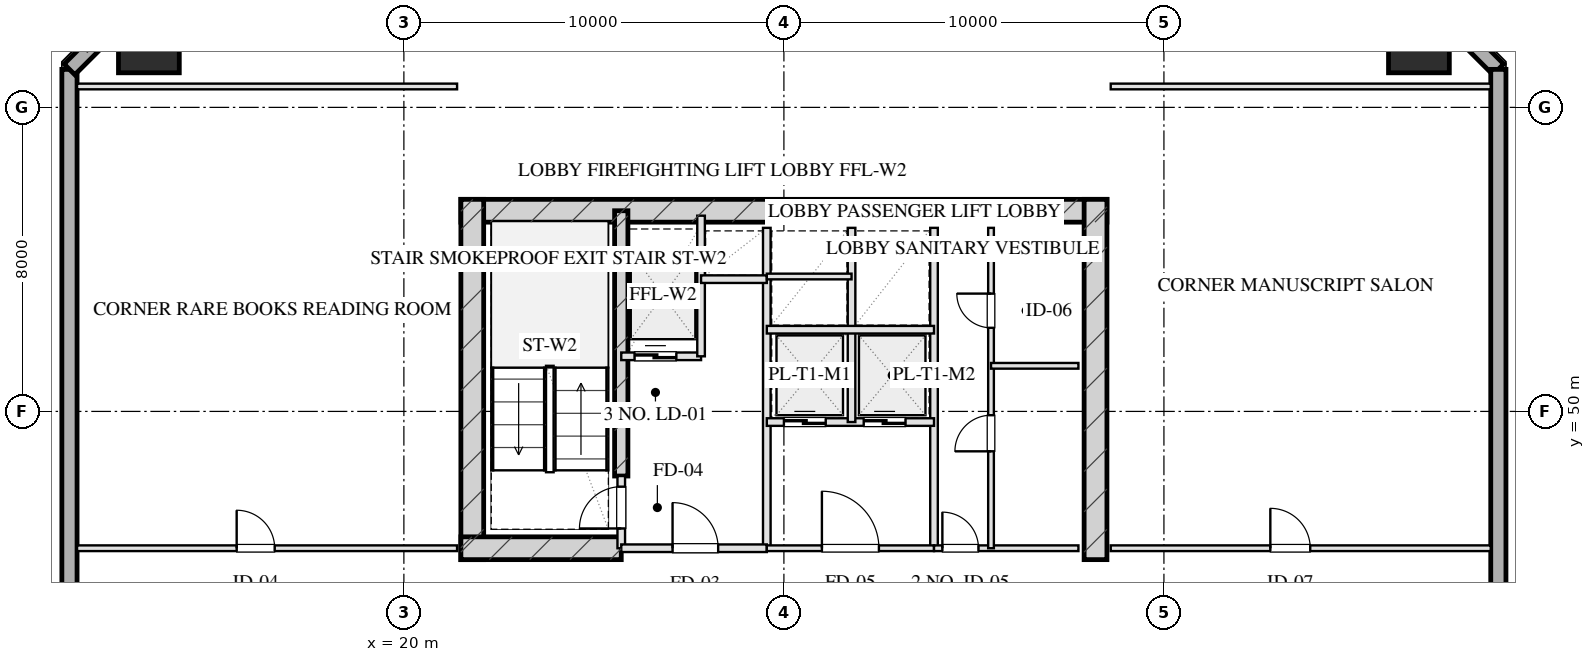
"""IFC4 building model, lengths in metres.
Left out: names, types, materials, properties, quantities, classifications, styles, units other than length and angle.
Written with IfcOpenShell. Run it as: python <this file> out.ifc"""

import sys

from ifc_helpers import new_model, si_unit, direction, frame, frame_2d, origin, origin_2d, place, context, subcontext, project, spatial, rectangle, hollow_rectangle, extrude, element, fill, save


model = new_model("IFC4")
c1 = context("Model", 3, precision=1e-05, world=origin(), true_north=direction((0.0, 1.0)))
c2 = subcontext(c1, "Body", "Model", "MODEL_VIEW")
j1 = project(units=[si_unit("LENGTHUNIT", "METRE"), si_unit("PLANEANGLEUNIT", "RADIAN")], contexts=[c1])
p1 = place(None, origin())
s1 = spatial("IfcSite", under=j1, at=p1, CompositionType="ELEMENT")
p2 = place(p1, origin())
s2 = spatial("IfcBuilding", under=s1, at=p2, CompositionType="ELEMENT")
p3 = place(p2, frame((0.0, 0.0, 100.05)))
s3 = spatial("IfcBuildingStorey", under=s2, at=p3, CompositionType="ELEMENT", Elevation=100.05)
p4 = place(p3, frame((21.5, 55.28, 0.0), z_axis=(0.0, 0.0, 1.0), x_axis=(1.0, 0.0, 0.0)))
e1 = element("IfcWall", 1, at=p4, inside=s3, PredefinedType="SHEAR", context=c2, shape_type="SweptSolid", body=[
    extrude(rectangle(XDim=17.0, YDim=0.6, at=frame_2d((8.5, 0.0))), origin(), (0.0, 0.0, 1.0), 3.45),
])
for number, where, z_axis, x_axis in (
    (2, (21.8, 46.1, 0.0), (0.0, 0.0, 1.0), (0.0, 1.0, 0.0)),
    (3, (38.2, 46.1, 0.0), (0.0, 0.0, 1.0), (0.0, 1.0, 0.0)),
):
    element("IfcWall", number, at=place(p3, frame(where, z_axis=z_axis, x_axis=x_axis)), inside=s3, PredefinedType="SHEAR", context=c2, shape_type="SweptSolid", body=[
        extrude(rectangle(XDim=9.48, YDim=0.6, at=frame_2d((4.74, 0.0))), origin(), (0.0, 0.0, 1.0), 3.45),
    ])
p5 = place(p3, frame((25.72, 48.3, 0.0), z_axis=(0.0, 0.0, 1.0), x_axis=(0.0, 1.0, 0.0)))
e4 = element("IfcWall", 4, at=p5, inside=s3, PredefinedType="SHEAR", context=c2, shape_type="SweptSolid", body=[
    extrude(rectangle(XDim=6.98, YDim=0.35, at=frame_2d((3.49, 0.0))), origin(), (0.0, 0.0, 1.0), 3.45),
])
p6 = place(p3, frame((21.5, 46.4, 0.0), z_axis=(0.0, 0.0, 1.0), x_axis=(1.0, 0.0, 0.0)))
e5 = element("IfcWall", 5, at=p6, inside=s3, PredefinedType="SHEAR", context=c2, shape_type="SweptSolid", body=[
    extrude(rectangle(XDim=4.22, YDim=0.6, at=frame_2d((2.11, 0.0))), origin(), (0.0, 0.0, 1.0), 3.45),
])
for number, where, z_axis, x_axis in (
    (6, (46.71, 59.71, 0.0), (0.0, 0.0, 1.0), (1.0, 0.0, 0.0)),
    (7, (13.29, 59.71, 0.0), (0.0, 0.0, 1.0), (1.0, 0.0, 0.0)),
):
    element("IfcColumn", number, at=place(p3, frame(where, z_axis=z_axis, x_axis=x_axis)), inside=s3, PredefinedType="COLUMN", context=c2, shape_type="SweptSolid", body=[
        extrude(hollow_rectangle(XDim=1.6, YDim=1.6, WallThickness=0.055, at=origin_2d()), origin(), (0.0, 0.0, 1.0), 3.451),
    ])
p7 = place(p3, frame((11.2, 9.0, 0.0), z_axis=(0.0, 0.0, 1.0), x_axis=(0.0, 1.0, 0.0)))
e8 = element("IfcWall", 8, at=p7, inside=s3, PredefinedType="SOLIDWALL", context=c2, shape_type="SweptSolid", body=[
    extrude(rectangle(XDim=50.0, YDim=0.4, at=frame_2d((25.0, 0.0))), origin(), (0.0, 0.0, 1.0), 2.55),
])
p8 = place(p7, frame((21.2, 0.0, 0.75)))
e9 = element("IfcOpeningElement", 9, at=p8, cuts=e8, PredefinedType="OPENING", context=c2, shape_type="SweptSolid", body=[
    extrude(rectangle(XDim=2.4, YDim=1.4, at=frame_2d((1.2, 0.7))), frame((0.0, 0.21, 0.0), z_axis=(0.0, -1.0, 0.0), x_axis=(1.0, 0.0, 0.0)), (0.0, 0.0, 1.0), 0.42),
])
p9 = place(p7, frame((27.55, 0.0, 0.0)))
e10 = element("IfcOpeningElement", 10, at=p9, cuts=e8, PredefinedType="OPENING", context=c2, shape_type="SweptSolid", body=[
    extrude(rectangle(XDim=1.1, YDim=2.15, at=frame_2d((0.55, 1.075))), frame((0.0, 0.21, 0.0), z_axis=(0.0, -1.0, 0.0), x_axis=(1.0, 0.0, 0.0)), (0.0, 0.0, 1.0), 0.42),
])
for number, where, z_axis, x_axis in (
    (11, (11.2, 59.0, 0.0), (0.0, 0.0, 1.0), (0.707, 0.707, 0.0)),
    (12, (46.0, 61.8, 0.0), (0.0, 0.0, 1.0), (0.707, -0.707, 0.0)),
):
    element("IfcWall", number, at=place(p3, frame(where, z_axis=z_axis, x_axis=x_axis)), inside=s3, PredefinedType="SOLIDWALL", context=c2, shape_type="SweptSolid", body=[
        extrude(rectangle(XDim=3.96, YDim=0.4, at=frame_2d((1.98, 0.0))), origin(), (0.0, 0.0, 1.0), 2.55),
    ])
p10 = place(p3, frame((48.8, 59.0, 0.0), z_axis=(0.0, 0.0, 1.0), x_axis=(0.0, -1.0, 0.0)))
e13 = element("IfcWall", 13, at=p10, inside=s3, PredefinedType="SOLIDWALL", context=c2, shape_type="SweptSolid", body=[
    extrude(rectangle(XDim=50.0, YDim=0.4, at=frame_2d((25.0, 0.0))), origin(), (0.0, 0.0, 1.0), 2.55),
])
p11 = place(p10, frame((18.65, 0.0, 0.0)))
e14 = element("IfcOpeningElement", 14, at=p11, cuts=e13, PredefinedType="OPENING", context=c2, shape_type="SweptSolid", body=[
    extrude(rectangle(XDim=1.1, YDim=2.15, at=frame_2d((0.55, 1.075))), frame((0.0, 0.21, 0.0), z_axis=(0.0, -1.0, 0.0), x_axis=(1.0, 0.0, 0.0)), (0.0, 0.0, 1.0), 0.42),
])
p12 = place(p3, frame((25.72, 46.4, 0.0), z_axis=(0.0, 0.0, 1.0), x_axis=(0.0, 1.0, 0.0)))
e15 = element("IfcWall", 15, at=p12, inside=s3, PredefinedType="PARTITIONING", context=c2, shape_type="SweptSolid", body=[
    extrude(rectangle(XDim=1.9, YDim=0.2, at=frame_2d((0.95, 0.0))), origin(), (0.0, 0.0, 1.0), 3.155),
])
p13 = place(p12, frame((0.52, 0.0, 0.0)))
e16 = element("IfcOpeningElement", 16, at=p13, cuts=e15, PredefinedType="OPENING", context=c2, shape_type="SweptSolid", body=[
    extrude(rectangle(XDim=1.1, YDim=2.05, at=frame_2d((0.55, 1.025))), frame((0.0, 0.11, 0.0), z_axis=(0.0, -1.0, 0.0), x_axis=(1.0, 0.0, 0.0)), (0.0, 0.0, 1.0), 0.22),
])
p14 = place(p3, frame((29.55, 46.4, 0.0), z_axis=(0.0, 0.0, 1.0), x_axis=(0.0, 1.0, 0.0)))
e17 = element("IfcWall", 17, at=p14, inside=s3, PredefinedType="PARTITIONING", context=c2, shape_type="SweptSolid", body=[
    extrude(rectangle(XDim=8.43, YDim=0.2, at=frame_2d((4.215, 0.0))), origin(), (0.0, 0.0, 1.0), 3.155),
])
p15 = place(p3, frame((25.72, 46.4, 0.0), z_axis=(0.0, 0.0, 1.0), x_axis=(1.0, 0.0, 0.0)))
e18 = element("IfcWall", 18, at=p15, inside=s3, PredefinedType="PARTITIONING", context=c2, shape_type="SweptSolid", body=[
    extrude(rectangle(XDim=3.83, YDim=0.2, at=frame_2d((1.915, 0.0))), origin(), (0.0, 0.0, 1.0), 3.155),
])
p16 = place(p15, frame((1.35, 0.0, 0.0)))
e19 = element("IfcOpeningElement", 19, at=p16, cuts=e18, PredefinedType="OPENING", context=c2, shape_type="SweptSolid", body=[
    extrude(rectangle(XDim=1.2, YDim=2.05, at=frame_2d((0.6, 1.025))), frame((0.0, 0.11, 0.0), z_axis=(0.0, -1.0, 0.0), x_axis=(1.0, 0.0, 0.0)), (0.0, 0.0, 1.0), 0.22),
])
p17 = place(p3, frame((25.72, 51.45, 0.0), z_axis=(0.0, 0.0, 1.0), x_axis=(1.0, 0.0, 0.0)))
e20 = element("IfcWall", 20, at=p17, inside=s3, PredefinedType="PARTITIONING", context=c2, shape_type="SweptSolid", body=[
    extrude(rectangle(XDim=2.1, YDim=0.2, at=frame_2d((1.05, 0.0))), origin(), (0.0, 0.0, 1.0), 3.155),
])
p18 = place(p17, frame((0.35, 0.0, 0.0)))
e21 = element("IfcOpeningElement", 21, at=p18, cuts=e20, PredefinedType="OPENING", context=c2, shape_type="SweptSolid", body=[
    extrude(rectangle(XDim=1.1, YDim=2.05, at=frame_2d((0.55, 1.025))), frame((0.0, 0.11, 0.0), z_axis=(0.0, -1.0, 0.0), x_axis=(1.0, 0.0, 0.0)), (0.0, 0.0, 1.0), 0.22),
])
p19 = place(p3, frame((27.82, 51.45, 0.0), z_axis=(0.0, 0.0, 1.0), x_axis=(0.0, 1.0, 0.0)))
e22 = element("IfcWall", 22, at=p19, inside=s3, PredefinedType="PARTITIONING", context=c2, shape_type="SweptSolid", body=[
    extrude(rectangle(XDim=3.7, YDim=0.2, at=frame_2d((1.85, 0.0))), origin(), (0.0, 0.0, 1.0), 3.155),
])
p20 = place(p3, frame((27.82, 53.48, 0.0), z_axis=(0.0, 0.0, 1.0), x_axis=(1.0, 0.0, 0.0)))
e23 = element("IfcWall", 23, at=p20, inside=s3, PredefinedType="PARTITIONING", context=c2, shape_type="SweptSolid", body=[
    extrude(rectangle(XDim=1.73, YDim=0.2, at=frame_2d((0.865, 0.0))), origin(), (0.0, 0.0, 1.0), 3.155),
])
p21 = place(p3, frame((33.95, 46.4, 0.0), z_axis=(0.0, 0.0, 1.0), x_axis=(0.0, 1.0, 0.0)))
e24 = element("IfcWall", 24, at=p21, inside=s3, PredefinedType="PARTITIONING", context=c2, shape_type="SweptSolid", body=[
    extrude(rectangle(XDim=8.43, YDim=0.2, at=frame_2d((4.215, 0.0))), origin(), (0.0, 0.0, 1.0), 3.155),
])
p22 = place(p3, frame((29.55, 46.4, 0.0), z_axis=(0.0, 0.0, 1.0), x_axis=(1.0, 0.0, 0.0)))
e25 = element("IfcWall", 25, at=p22, inside=s3, PredefinedType="PARTITIONING", context=c2, shape_type="SweptSolid", body=[
    extrude(rectangle(XDim=4.4, YDim=0.15, at=frame_2d((2.2, 0.0))), origin(), (0.0, 0.0, 1.0), 3.155),
])
p23 = place(p22, frame((1.45, 0.0, 0.0)))
e26 = element("IfcOpeningElement", 26, at=p23, cuts=e25, PredefinedType="OPENING", context=c2, shape_type="SweptSolid", body=[
    extrude(rectangle(XDim=1.5, YDim=2.05, at=frame_2d((0.75, 1.025))), frame((0.0, 0.085, 0.0), z_axis=(0.0, -1.0, 0.0), x_axis=(1.0, 0.0, 0.0)), (0.0, 0.0, 1.0), 0.17),
])
p24 = place(p3, frame((29.55, 49.72, 0.0), z_axis=(0.0, 0.0, 1.0), x_axis=(1.0, 0.0, 0.0)))
e27 = element("IfcWall", 27, at=p24, inside=s3, PredefinedType="PARTITIONING", context=c2, shape_type="SweptSolid", body=[
    extrude(rectangle(XDim=4.4, YDim=0.2, at=frame_2d((2.2, 0.0))), origin(), (0.0, 0.0, 1.0), 3.155),
])
p25 = place(p24, frame((0.45, 0.0, 0.0)))
e28 = element("IfcOpeningElement", 28, at=p25, cuts=e27, PredefinedType="OPENING", context=c2, shape_type="SweptSolid", body=[
    extrude(rectangle(XDim=1.1, YDim=2.05, at=frame_2d((0.55, 1.025))), frame((0.0, 0.11, 0.0), z_axis=(0.0, -1.0, 0.0), x_axis=(1.0, 0.0, 0.0)), (0.0, 0.0, 1.0), 0.22),
])
p26 = place(p24, frame((2.55, 0.0, 0.0)))
e29 = element("IfcOpeningElement", 29, at=p26, cuts=e27, PredefinedType="OPENING", context=c2, shape_type="SweptSolid", body=[
    extrude(rectangle(XDim=1.1, YDim=2.05, at=frame_2d((0.55, 1.025))), frame((0.0, 0.11, 0.0), z_axis=(0.0, -1.0, 0.0), x_axis=(1.0, 0.0, 0.0)), (0.0, 0.0, 1.0), 0.22),
])
p27 = place(p3, frame((31.78, 49.72, 0.0), z_axis=(0.0, 0.0, 1.0), x_axis=(0.0, 1.0, 0.0)))
e30 = element("IfcWall", 30, at=p27, inside=s3, PredefinedType="PARTITIONING", context=c2, shape_type="SweptSolid", body=[
    extrude(rectangle(XDim=5.11, YDim=0.2, at=frame_2d((2.555, 0.0))), origin(), (0.0, 0.0, 1.0), 3.155),
])
p28 = place(p3, frame((29.55, 52.15, 0.0), z_axis=(0.0, 0.0, 1.0), x_axis=(1.0, 0.0, 0.0)))
e31 = element("IfcWall", 31, at=p28, inside=s3, PredefinedType="PARTITIONING", context=c2, shape_type="SweptSolid", body=[
    extrude(rectangle(XDim=4.4, YDim=0.2, at=frame_2d((2.2, 0.0))), origin(), (0.0, 0.0, 1.0), 3.155),
])
p29 = place(p3, frame((29.55, 53.55, 0.0), z_axis=(0.0, 0.0, 1.0), x_axis=(1.0, 0.0, 0.0)))
e32 = element("IfcWall", 32, at=p29, inside=s3, PredefinedType="PARTITIONING", context=c2, shape_type="SweptSolid", body=[
    extrude(rectangle(XDim=2.23, YDim=0.15, at=frame_2d((1.115, 0.0))), origin(), (0.0, 0.0, 1.0), 3.155),
])
p30 = place(p3, frame((33.95, 46.4, 0.0), z_axis=(0.0, 0.0, 1.0), x_axis=(1.0, 0.0, 0.0)))
e33 = element("IfcWall", 33, at=p30, inside=s3, PredefinedType="PARTITIONING", context=c2, shape_type="SweptSolid", body=[
    extrude(rectangle(XDim=3.8, YDim=0.15, at=frame_2d((1.9, 0.0))), origin(), (0.0, 0.0, 1.0), 3.155),
])
p31 = place(p30, frame((0.22, 0.0, 0.0)))
e34 = element("IfcOpeningElement", 34, at=p31, cuts=e33, PredefinedType="OPENING", context=c2, shape_type="SweptSolid", body=[
    extrude(rectangle(XDim=0.95, YDim=2.05, at=frame_2d((0.475, 1.025))), frame((0.0, 0.085, 0.0), z_axis=(0.0, -1.0, 0.0), x_axis=(1.0, 0.0, 0.0)), (0.0, 0.0, 1.0), 0.17),
])
p32 = place(p3, frame((35.45, 46.4, 0.0), z_axis=(0.0, 0.0, 1.0), x_axis=(0.0, 1.0, 0.0)))
e35 = element("IfcWall", 35, at=p32, inside=s3, PredefinedType="PARTITIONING", context=c2, shape_type="SweptSolid", body=[
    extrude(rectangle(XDim=8.43, YDim=0.15, at=frame_2d((4.215, 0.0))), origin(), (0.0, 0.0, 1.0), 2.815),
])
p33 = place(p32, frame((2.55, 0.0, 0.0)))
e36 = element("IfcOpeningElement", 36, at=p33, cuts=e35, PredefinedType="OPENING", context=c2, shape_type="SweptSolid", body=[
    extrude(rectangle(XDim=0.95, YDim=2.05, at=frame_2d((0.475, 1.025))), frame((0.0, 0.085, 0.0), z_axis=(0.0, -1.0, 0.0), x_axis=(1.0, 0.0, 0.0)), (0.0, 0.0, 1.0), 0.17),
])
p34 = place(p32, frame((5.8, 0.0, 0.0)))
e37 = element("IfcOpeningElement", 37, at=p34, cuts=e35, PredefinedType="OPENING", context=c2, shape_type="SweptSolid", body=[
    extrude(rectangle(XDim=0.9, YDim=2.05, at=frame_2d((0.45, 1.025))), frame((0.0, 0.085, 0.0), z_axis=(0.0, -1.0, 0.0), x_axis=(1.0, 0.0, 0.0)), (0.0, 0.0, 1.0), 0.17),
])
p35 = place(p3, frame((35.45, 51.2, 0.0), z_axis=(0.0, 0.0, 1.0), x_axis=(1.0, 0.0, 0.0)))
e38 = element("IfcWall", 38, at=p35, inside=s3, PredefinedType="PARTITIONING", context=c2, shape_type="SweptSolid", body=[
    extrude(rectangle(XDim=2.3, YDim=0.15, at=frame_2d((1.15, 0.0))), origin(), (0.0, 0.0, 1.0), 3.155),
])
p36 = place(p3, frame((11.4, 58.55, 0.0), z_axis=(0.0, 0.0, 1.0), x_axis=(1.0, 0.0, 0.0)))
e39 = element("IfcWall", 39, at=p36, inside=s3, PredefinedType="PARTITIONING", context=c2, shape_type="SweptSolid", body=[
    extrude(rectangle(XDim=10.0, YDim=0.15, at=frame_2d((5.0, 0.0))), origin(), (0.0, 0.0, 1.0), 3.155),
])
p37 = place(p3, frame((11.4, 46.4, 0.0), z_axis=(0.0, 0.0, 1.0), x_axis=(1.0, 0.0, 0.0)))
e40 = element("IfcWall", 40, at=p37, inside=s3, PredefinedType="PARTITIONING", context=c2, shape_type="SweptSolid", body=[
    extrude(rectangle(XDim=10.0, YDim=0.15, at=frame_2d((5.0, 0.0))), origin(), (0.0, 0.0, 1.0), 3.155),
])
p38 = place(p37, frame((4.2, 0.0, 0.0)))
e41 = element("IfcOpeningElement", 41, at=p38, cuts=e40, PredefinedType="OPENING", context=c2, shape_type="SweptSolid", body=[
    extrude(rectangle(XDim=1.0, YDim=2.05, at=frame_2d((0.5, 1.025))), frame((0.0, 0.085, 0.0), z_axis=(0.0, -1.0, 0.0), x_axis=(1.0, 0.0, 0.0)), (0.0, 0.0, 1.0), 0.17),
])
p39 = place(p3, frame((38.6, 58.55, 0.0), z_axis=(0.0, 0.0, 1.0), x_axis=(1.0, 0.0, 0.0)))
e42 = element("IfcWall", 42, at=p39, inside=s3, PredefinedType="PARTITIONING", context=c2, shape_type="SweptSolid", body=[
    extrude(rectangle(XDim=10.0, YDim=0.15, at=frame_2d((5.0, 0.0))), origin(), (0.0, 0.0, 1.0), 3.155),
])
p40 = place(p3, frame((38.6, 46.4, 0.0), z_axis=(0.0, 0.0, 1.0), x_axis=(1.0, 0.0, 0.0)))
e43 = element("IfcWall", 43, at=p40, inside=s3, PredefinedType="PARTITIONING", context=c2, shape_type="SweptSolid", body=[
    extrude(rectangle(XDim=10.0, YDim=0.15, at=frame_2d((5.0, 0.0))), origin(), (0.0, 0.0, 1.0), 3.155),
])
p41 = place(p40, frame((4.2, 0.0, 0.0)))
e44 = element("IfcOpeningElement", 44, at=p41, cuts=e43, PredefinedType="OPENING", context=c2, shape_type="SweptSolid", body=[
    extrude(rectangle(XDim=1.05, YDim=2.05, at=frame_2d((0.525, 1.025))), frame((0.0, 0.085, 0.0), z_axis=(0.0, -1.0, 0.0), x_axis=(1.0, 0.0, 0.0)), (0.0, 0.0, 1.0), 0.17),
])
p42 = place(p13, origin())
e45 = element("IfcDoor", 45, at=p42, inside=s3, OperationType="SINGLE_SWING_LEFT", PredefinedType="DOOR", context=c2, shape_type="SweptSolid", body=[
    extrude(rectangle(XDim=1.1, YDim=2.05, at=frame_2d((0.55, 1.025))), frame((0.0, 0.025, 0.0), z_axis=(0.0, -1.0, 0.0), x_axis=(1.0, 0.0, 0.0)), (0.0, 0.0, 1.0), 0.05),
])
fill(e16, e45)
p43 = place(p16, origin())
e46 = element("IfcDoor", 46, at=p43, inside=s3, OperationType="SINGLE_SWING_LEFT", PredefinedType="DOOR", context=c2, shape_type="SweptSolid", body=[
    extrude(rectangle(XDim=1.2, YDim=2.05, at=frame_2d((0.6, 1.025))), frame((0.0, 0.025, 0.0), z_axis=(0.0, -1.0, 0.0), x_axis=(1.0, 0.0, 0.0)), (0.0, 0.0, 1.0), 0.05),
])
fill(e19, e46)
p44 = place(p18, origin())
e47 = element("IfcDoor", 47, at=p44, inside=s3, OperationType="DOUBLE_DOOR_SLIDING", PredefinedType="DOOR", context=c2, shape_type="SweptSolid", body=[
    extrude(rectangle(XDim=1.1, YDim=2.05, at=frame_2d((0.55, 1.025))), frame((0.0, 0.025, 0.0), z_axis=(0.0, -1.0, 0.0), x_axis=(1.0, 0.0, 0.0)), (0.0, 0.0, 1.0), 0.05),
])
fill(e21, e47)
p45 = place(p23, origin())
e48 = element("IfcDoor", 48, at=p45, inside=s3, OperationType="SINGLE_SWING_LEFT", PredefinedType="DOOR", context=c2, shape_type="SweptSolid", body=[
    extrude(rectangle(XDim=1.5, YDim=2.05, at=frame_2d((0.75, 1.025))), frame((0.0, 0.025, 0.0), z_axis=(0.0, -1.0, 0.0), x_axis=(1.0, 0.0, 0.0)), (0.0, 0.0, 1.0), 0.05),
])
fill(e26, e48)
p46 = place(p25, origin())
e49 = element("IfcDoor", 49, at=p46, inside=s3, OperationType="DOUBLE_DOOR_SLIDING", PredefinedType="DOOR", context=c2, shape_type="SweptSolid", body=[
    extrude(rectangle(XDim=1.1, YDim=2.05, at=frame_2d((0.55, 1.025))), frame((0.0, 0.025, 0.0), z_axis=(0.0, -1.0, 0.0), x_axis=(1.0, 0.0, 0.0)), (0.0, 0.0, 1.0), 0.05),
])
fill(e28, e49)
p47 = place(p26, origin())
e50 = element("IfcDoor", 50, at=p47, inside=s3, OperationType="DOUBLE_DOOR_SLIDING", PredefinedType="DOOR", context=c2, shape_type="SweptSolid", body=[
    extrude(rectangle(XDim=1.1, YDim=2.05, at=frame_2d((0.55, 1.025))), frame((0.0, 0.025, 0.0), z_axis=(0.0, -1.0, 0.0), x_axis=(1.0, 0.0, 0.0)), (0.0, 0.0, 1.0), 0.05),
])
fill(e29, e50)
p48 = place(p31, origin())
e51 = element("IfcDoor", 51, at=p48, inside=s3, OperationType="SINGLE_SWING_LEFT", PredefinedType="DOOR", context=c2, shape_type="SweptSolid", body=[
    extrude(rectangle(XDim=0.95, YDim=2.05, at=frame_2d((0.475, 1.025))), frame((0.0, 0.025, 0.0), z_axis=(0.0, -1.0, 0.0), x_axis=(1.0, 0.0, 0.0)), (0.0, 0.0, 1.0), 0.05),
])
fill(e34, e51)
p49 = place(p33, origin())
e52 = element("IfcDoor", 52, at=p49, inside=s3, OperationType="SINGLE_SWING_LEFT", PredefinedType="DOOR", context=c2, shape_type="SweptSolid", body=[
    extrude(rectangle(XDim=0.95, YDim=2.05, at=frame_2d((0.475, 1.025))), frame((0.0, 0.025, 0.0), z_axis=(0.0, -1.0, 0.0), x_axis=(1.0, 0.0, 0.0)), (0.0, 0.0, 1.0), 0.05),
])
fill(e36, e52)
p50 = place(p34, origin())
e53 = element("IfcDoor", 53, at=p50, inside=s3, OperationType="SINGLE_SWING_RIGHT", PredefinedType="DOOR", context=c2, shape_type="SweptSolid", body=[
    extrude(rectangle(XDim=0.9, YDim=2.05, at=frame_2d((0.45, 1.025))), frame((0.0, 0.025, 0.0), z_axis=(0.0, -1.0, 0.0), x_axis=(1.0, 0.0, 0.0)), (0.0, 0.0, 1.0), 0.05),
])
fill(e37, e53)
p51 = place(p38, origin())
e54 = element("IfcDoor", 54, at=p51, inside=s3, OperationType="SINGLE_SWING_LEFT", PredefinedType="DOOR", context=c2, shape_type="SweptSolid", body=[
    extrude(rectangle(XDim=1.0, YDim=2.05, at=frame_2d((0.5, 1.025))), frame((0.0, 0.025, 0.0), z_axis=(0.0, -1.0, 0.0), x_axis=(1.0, 0.0, 0.0)), (0.0, 0.0, 1.0), 0.05),
])
fill(e41, e54)
p52 = place(p41, origin())
e55 = element("IfcDoor", 55, at=p52, inside=s3, OperationType="SINGLE_SWING_LEFT", PredefinedType="DOOR", context=c2, shape_type="SweptSolid", body=[
    extrude(rectangle(XDim=1.05, YDim=2.05, at=frame_2d((0.525, 1.025))), frame((0.0, 0.025, 0.0), z_axis=(0.0, -1.0, 0.0), x_axis=(1.0, 0.0, 0.0)), (0.0, 0.0, 1.0), 0.05),
])
fill(e44, e55)
save(model, sys.argv[1])
